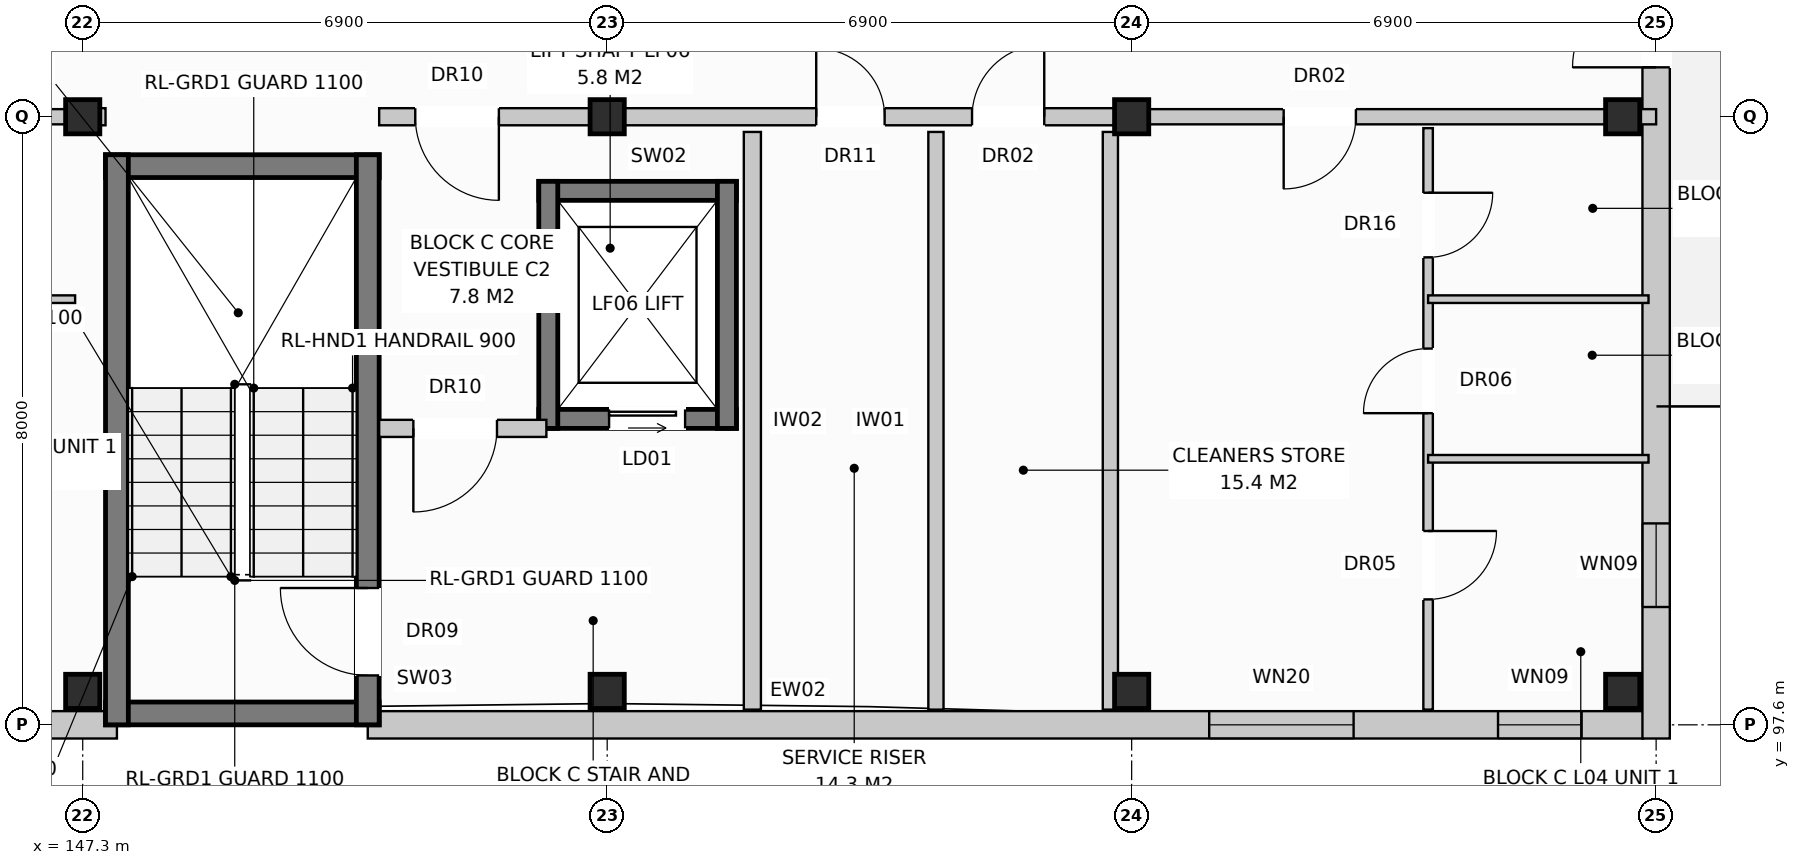
"""IFC4 building model, lengths in metres.
Left out: names, types, materials, properties, quantities, classifications, styles, units other than length and angle.
Written with IfcOpenShell. Run it as: python <this file> out.ifc"""

import sys

from ifc_helpers import new_model, si_unit, direction, frame, frame_2d, origin, origin_with_axes, origin_2d, place, context, subcontext, project, spatial, rectangle, extrude, element, fill, save


model = new_model("IFC4")
c1 = context("Model", 3, precision=1e-05, world=origin(), true_north=direction((0.0, 1.0)))
c2 = subcontext(c1, "Body", "Model", "MODEL_VIEW")
j1 = project(units=[si_unit("LENGTHUNIT", "METRE"), si_unit("PLANEANGLEUNIT", "RADIAN")], contexts=[c1])
p1 = place(None, origin())
s1 = spatial("IfcSite", under=j1, at=p1, CompositionType="ELEMENT")
p2 = place(p1, origin())
s2 = spatial("IfcBuilding", under=s1, at=p2, CompositionType="ELEMENT")
p3 = place(p2, frame((0.0, 0.0, 14.4)))
s3 = spatial("IfcBuildingStorey", under=s2, at=p3, CompositionType="ELEMENT", Elevation=14.4)
for number, where, z_axis, x_axis in (
    (1, (147.3, 98.04, 0.0), (0.0, 0.0, 1.0), (1.0, 0.0, 0.0)),
    (2, (147.3, 105.6, 0.0), (0.0, 0.0, 1.0), (1.0, 0.0, 0.0)),
    (3, (154.2, 98.04, 0.0), (0.0, 0.0, 1.0), (1.0, 0.0, 0.0)),
    (4, (154.2, 105.6, 0.0), (0.0, 0.0, 1.0), (1.0, 0.0, 0.0)),
    (5, (161.1, 98.04, 0.0), (0.0, 0.0, 1.0), (1.0, 0.0, 0.0)),
    (6, (161.1, 105.6, 0.0), (0.0, 0.0, 1.0), (1.0, 0.0, 0.0)),
    (7, (167.56, 98.04, 0.0), (0.0, 0.0, 1.0), (1.0, 0.0, 0.0)),
    (8, (167.56, 105.6, 0.0), (0.0, 0.0, 1.0), (1.0, 0.0, 0.0)),
):
    element("IfcColumn", number, at=place(p3, frame(where, z_axis=z_axis, x_axis=x_axis)), inside=s3, PredefinedType="COLUMN", context=c2, shape_type="SweptSolid", body=[
        extrude(rectangle(XDim=0.45, YDim=0.45, at=origin_2d()), origin(), (0.0, 0.0, 1.0), 3.2),
    ])
p4 = place(p3, frame((130.35, 97.6, 0.0), z_axis=(0.0, 0.0, 1.0), x_axis=(1.0, 0.0, 0.0)))
e9 = element("IfcWall", 9, at=p4, inside=s3, PredefinedType="STANDARD", context=c2, shape_type="SweptSolid", body=[
    extrude(rectangle(XDim=17.4, YDim=0.36, at=frame_2d((8.7, 0.0))), origin(), (0.0, 0.0, 1.0), 2.94),
])
p5 = place(p4, frame((11.82, 0.0, 0.0)))
e10 = element("IfcOpeningElement", 10, at=p5, cuts=e9, PredefinedType="OPENING", context=c2, shape_type="SweptSolid", body=[
    extrude(rectangle(XDim=1.05, YDim=2.12, at=frame_2d((0.525, 1.06))), frame((0.0, 0.192, 0.0), z_axis=(0.0, -1.0, 0.0), x_axis=(1.0, 0.0, 0.0)), (0.0, 0.0, 1.0), 0.384),
])
p6 = place(p4, frame((14.87, 0.0, 0.72)))
e11 = element("IfcOpeningElement", 11, at=p6, cuts=e9, PredefinedType="OPENING", context=c2, shape_type="SweptSolid", body=[
    extrude(rectangle(XDim=1.1, YDim=1.5, at=frame_2d((0.55, 0.75))), frame((0.0, 0.192, 0.0), z_axis=(0.0, -1.0, 0.0), x_axis=(1.0, 0.0, 0.0)), (0.0, 0.0, 1.0), 0.384),
])
p7 = place(p3, frame((151.05, 97.6, 0.0), z_axis=(0.0, 0.0, 1.0), x_axis=(1.0, 0.0, 0.0)))
e12 = element("IfcWall", 12, at=p7, inside=s3, PredefinedType="STANDARD", context=c2, shape_type="SweptSolid", body=[
    extrude(rectangle(XDim=16.78, YDim=0.36, at=frame_2d((8.39, 0.0))), origin(), (0.0, 0.0, 1.0), 2.94),
])
p8 = place(p7, frame((11.07, 0.0, 0.8)))
e13 = element("IfcOpeningElement", 13, at=p8, cuts=e12, PredefinedType="OPENING", context=c2, shape_type="SweptSolid", body=[
    extrude(rectangle(XDim=1.9, YDim=1.85, at=frame_2d((0.95, 0.925))), frame((0.0, 0.192, 0.0), z_axis=(0.0, -1.0, 0.0), x_axis=(1.0, 0.0, 0.0)), (0.0, 0.0, 1.0), 0.384),
])
p9 = place(p7, frame((14.87, 0.0, 0.72)))
e14 = element("IfcOpeningElement", 14, at=p9, cuts=e12, PredefinedType="OPENING", context=c2, shape_type="SweptSolid", body=[
    extrude(rectangle(XDim=1.1, YDim=1.5, at=frame_2d((0.55, 0.75))), frame((0.0, 0.192, 0.0), z_axis=(0.0, -1.0, 0.0), x_axis=(1.0, 0.0, 0.0)), (0.0, 0.0, 1.0), 0.384),
])
p10 = place(p3, frame((168.0, 97.42, 0.0), z_axis=(0.0, 0.0, 1.0), x_axis=(0.0, 1.0, 0.0)))
e15 = element("IfcWall", 15, at=p10, inside=s3, PredefinedType="STANDARD", context=c2, shape_type="SweptSolid", body=[
    extrude(rectangle(XDim=18.76, YDim=0.36, at=frame_2d((9.38, 0.0))), origin(), (0.0, 0.0, 1.0), 2.94),
])
p11 = place(p10, frame((8.83, 0.0, 0.0)))
e16 = element("IfcOpeningElement", 16, at=p11, cuts=e15, PredefinedType="OPENING", context=c2, shape_type="SweptSolid", body=[
    extrude(rectangle(XDim=1.1, YDim=2.1, at=frame_2d((0.55, 1.05))), frame((0.0, 0.192, 0.0), z_axis=(0.0, -1.0, 0.0), x_axis=(1.0, 0.0, 0.0)), (0.0, 0.0, 1.0), 0.384),
])
p12 = place(p10, frame((1.73, 0.0, 0.72)))
e17 = element("IfcOpeningElement", 17, at=p12, cuts=e15, PredefinedType="OPENING", context=c2, shape_type="SweptSolid", body=[
    extrude(rectangle(XDim=1.1, YDim=1.5, at=frame_2d((0.55, 0.75))), frame((0.0, 0.192, 0.0), z_axis=(0.0, -1.0, 0.0), x_axis=(1.0, 0.0, 0.0)), (0.0, 0.0, 1.0), 0.384),
])
p13 = place(p10, frame((15.93, 0.0, 0.72)))
e18 = element("IfcOpeningElement", 18, at=p13, cuts=e15, PredefinedType="OPENING", context=c2, shape_type="SweptSolid", body=[
    extrude(rectangle(XDim=1.1, YDim=1.5, at=frame_2d((0.55, 0.75))), frame((0.0, 0.192, 0.0), z_axis=(0.0, -1.0, 0.0), x_axis=(1.0, 0.0, 0.0)), (0.0, 0.0, 1.0), 0.384),
])
for number, where, z_axis, x_axis in (
    (19, (147.6, 97.75, 0.0), (0.0, 0.0, 1.0), (1.0, 0.0, 0.0)),
    (20, (147.6, 104.95, 0.0), (0.0, 0.0, 1.0), (1.0, 0.0, 0.0)),
):
    element("IfcWall", number, at=place(p3, frame(where, z_axis=z_axis, x_axis=x_axis)), inside=s3, PredefinedType="SHEAR", context=c2, shape_type="SweptSolid", body=[
        extrude(rectangle(XDim=3.6, YDim=0.3, at=frame_2d((1.8, 0.0))), origin(), (0.0, 0.0, 1.0), 2.94),
    ])
p14 = place(p3, frame((147.75, 97.6, 0.0), z_axis=(0.0, 0.0, 1.0), x_axis=(0.0, 1.0, 0.0)))
e21 = element("IfcWall", 21, at=p14, inside=s3, PredefinedType="SHEAR", context=c2, shape_type="SweptSolid", body=[
    extrude(rectangle(XDim=7.5, YDim=0.3, at=frame_2d((3.75, 0.0))), origin(), (0.0, 0.0, 1.0), 2.94),
])
p15 = place(p3, frame((151.05, 97.6, 0.0), z_axis=(0.0, 0.0, 1.0), x_axis=(0.0, 1.0, 0.0)))
e22 = element("IfcWall", 22, at=p15, inside=s3, PredefinedType="SHEAR", context=c2, shape_type="SweptSolid", body=[
    extrude(rectangle(XDim=7.5, YDim=0.3, at=frame_2d((3.75, 0.0))), origin(), (0.0, 0.0, 1.0), 2.94),
])
p16 = place(p15, frame((0.65, 0.0, 0.0)))
e23 = element("IfcOpeningElement", 23, at=p16, cuts=e22, PredefinedType="OPENING", context=c2, shape_type="SweptSolid", body=[
    extrude(rectangle(XDim=1.15, YDim=2.15, at=frame_2d((0.575, 1.075))), frame((0.0, 0.162, 0.0), z_axis=(0.0, -1.0, 0.0), x_axis=(1.0, 0.0, 0.0)), (0.0, 0.0, 1.0), 0.324),
])
p17 = place(p3, frame((153.3, 101.625, 0.0), z_axis=(0.0, 0.0, 1.0), x_axis=(1.0, 0.0, 0.0)))
e24 = element("IfcWall", 24, at=p17, inside=s3, PredefinedType="SHEAR", context=c2, shape_type="SweptSolid", body=[
    extrude(rectangle(XDim=2.6, YDim=0.25, at=frame_2d((1.3, 0.0))), origin(), (0.0, 0.0, 1.0), 2.94),
])
p18 = place(p17, frame((0.925, 0.0, 0.0)))
e25 = element("IfcOpeningElement", 25, at=p18, cuts=e24, PredefinedType="OPENING", context=c2, shape_type="SweptSolid", body=[
    extrude(rectangle(XDim=1.0, YDim=2.1, at=frame_2d((0.5, 1.05))), frame((0.0, 0.137, 0.0), z_axis=(0.0, -1.0, 0.0), x_axis=(1.0, 0.0, 0.0)), (0.0, 0.0, 1.0), 0.274),
])
p19 = place(p3, frame((153.3, 104.625, 0.0), z_axis=(0.0, 0.0, 1.0), x_axis=(1.0, 0.0, 0.0)))
e26 = element("IfcWall", 26, at=p19, inside=s3, PredefinedType="SHEAR", context=c2, shape_type="SweptSolid", body=[
    extrude(rectangle(XDim=2.6, YDim=0.25, at=frame_2d((1.3, 0.0))), origin(), (0.0, 0.0, 1.0), 2.94),
])
for number, where, z_axis, x_axis in (
    (27, (153.425, 101.5, 0.0), (0.0, 0.0, 1.0), (0.0, 1.0, 0.0)),
    (28, (155.775, 101.5, 0.0), (0.0, 0.0, 1.0), (0.0, 1.0, 0.0)),
):
    element("IfcWall", number, at=place(p3, frame(where, z_axis=z_axis, x_axis=x_axis)), inside=s3, PredefinedType="SHEAR", context=c2, shape_type="SweptSolid", body=[
        extrude(rectangle(XDim=3.25, YDim=0.25, at=frame_2d((1.625, 0.0))), origin(), (0.0, 0.0, 1.0), 2.94),
    ])
p20 = place(p3, frame((156.11, 97.8, 0.0), z_axis=(0.0, 0.0, 1.0), x_axis=(0.0, 1.0, 0.0)))
e29 = element("IfcWall", 29, at=p20, inside=s3, PredefinedType="PARTITIONING", context=c2, shape_type="SweptSolid", body=[
    extrude(rectangle(XDim=7.6, YDim=0.225, at=frame_2d((3.8, 0.0))), origin(), (0.0, 0.0, 1.0), 2.59),
])
p21 = place(p3, frame((151.2, 101.5, 0.0), z_axis=(0.0, 0.0, 1.0), x_axis=(1.0, 0.0, 0.0)))
e30 = element("IfcWall", 30, at=p21, inside=s3, PredefinedType="PARTITIONING", context=c2, shape_type="SweptSolid", body=[
    extrude(rectangle(XDim=2.2, YDim=0.225, at=frame_2d((1.1, 0.0))), origin(), (0.0, 0.0, 1.0), 2.94),
])
p22 = place(p21, frame((0.45, 0.0, 0.0)))
e31 = element("IfcOpeningElement", 31, at=p22, cuts=e30, PredefinedType="OPENING", context=c2, shape_type="SweptSolid", body=[
    extrude(rectangle(XDim=1.1, YDim=2.15, at=frame_2d((0.55, 1.075))), frame((0.0, 0.125, 0.0), z_axis=(0.0, -1.0, 0.0), x_axis=(1.0, 0.0, 0.0)), (0.0, 0.0, 1.0), 0.249),
])
p23 = place(p3, frame((147.3, 105.6, 0.0), z_axis=(0.0, 0.0, 1.0), x_axis=(1.0, 0.0, 0.0)))
e32 = element("IfcWall", 32, at=p23, inside=s3, PredefinedType="PARTITIONING", context=c2, shape_type="SweptSolid", body=[
    extrude(rectangle(XDim=0.3, YDim=0.225, at=frame_2d((0.15, 0.0))), origin(), (0.0, 0.0, 1.0), 2.94),
])
p24 = place(p3, frame((158.525, 97.8, 0.0), z_axis=(0.0, 0.0, 1.0), x_axis=(0.0, 1.0, 0.0)))
e33 = element("IfcWall", 33, at=p24, inside=s3, PredefinedType="PARTITIONING", context=c2, shape_type="SweptSolid", body=[
    extrude(rectangle(XDim=7.6, YDim=0.2, at=frame_2d((3.8, 0.0))), origin(), (0.0, 0.0, 1.0), 2.94),
])
p25 = place(p3, frame((160.82, 97.8, 0.0), z_axis=(0.0, 0.0, 1.0), x_axis=(0.0, 1.0, 0.0)))
e34 = element("IfcWall", 34, at=p25, inside=s3, PredefinedType="PARTITIONING", context=c2, shape_type="SweptSolid", body=[
    extrude(rectangle(XDim=7.6, YDim=0.2, at=frame_2d((3.8, 0.0))), origin(), (0.0, 0.0, 1.0), 2.38),
])
p26 = place(p3, frame((151.2, 105.6, 0.0), z_axis=(0.0, 0.0, 1.0), x_axis=(1.0, 0.0, 0.0)))
e35 = element("IfcWall", 35, at=p26, inside=s3, PredefinedType="PARTITIONING", context=c2, shape_type="SweptSolid", body=[
    extrude(rectangle(XDim=9.9, YDim=0.225, at=frame_2d((4.95, 0.0))), origin(), (0.0, 0.0, 1.0), 2.38),
])
p27 = place(p26, frame((0.475, 0.0, 0.0)))
e36 = element("IfcOpeningElement", 36, at=p27, cuts=e35, PredefinedType="OPENING", context=c2, shape_type="SweptSolid", body=[
    extrude(rectangle(XDim=1.1, YDim=2.15, at=frame_2d((0.55, 1.075))), frame((0.0, 0.125, 0.0), z_axis=(0.0, -1.0, 0.0), x_axis=(1.0, 0.0, 0.0)), (0.0, 0.0, 1.0), 0.249),
])
p28 = place(p26, frame((5.75, 0.0, 0.0)))
e37 = element("IfcOpeningElement", 37, at=p28, cuts=e35, PredefinedType="OPENING", context=c2, shape_type="SweptSolid", body=[
    extrude(rectangle(XDim=0.9, YDim=2.1, at=frame_2d((0.45, 1.05))), frame((0.0, 0.125, 0.0), z_axis=(0.0, -1.0, 0.0), x_axis=(1.0, 0.0, 0.0)), (0.0, 0.0, 1.0), 0.249),
])
p29 = place(p26, frame((7.8, 0.0, 0.0)))
e38 = element("IfcOpeningElement", 38, at=p29, cuts=e35, PredefinedType="OPENING", context=c2, shape_type="SweptSolid", body=[
    extrude(rectangle(XDim=0.95, YDim=2.15, at=frame_2d((0.475, 1.075))), frame((0.0, 0.125, 0.0), z_axis=(0.0, -1.0, 0.0), x_axis=(1.0, 0.0, 0.0)), (0.0, 0.0, 1.0), 0.249),
])
p30 = place(p3, frame((140.4, 105.6, 0.0), z_axis=(0.0, 0.0, 1.0), x_axis=(1.0, 0.0, 0.0)))
e39 = element("IfcWall", 39, at=p30, inside=s3, PredefinedType="PARTITIONING", context=c2, shape_type="SweptSolid", body=[
    extrude(rectangle(XDim=6.9, YDim=0.2, at=frame_2d((3.45, 0.0))), origin(), (0.0, 0.0, 1.0), 2.38),
])
p31 = place(p30, frame((2.0, 0.0, 0.0)))
e40 = element("IfcOpeningElement", 40, at=p31, cuts=e39, PredefinedType="OPENING", context=c2, shape_type="SweptSolid", body=[
    extrude(rectangle(XDim=0.95, YDim=2.15, at=frame_2d((0.475, 1.075))), frame((0.0, 0.112, 0.0), z_axis=(0.0, -1.0, 0.0), x_axis=(1.0, 0.0, 0.0)), (0.0, 0.0, 1.0), 0.224),
])
for number, where, z_axis, x_axis in (
    (41, (144.3, 103.2, 0.0), (0.0, 0.0, 1.0), (1.0, 0.0, 0.0)),
    (42, (144.3, 101.1, 0.0), (0.0, 0.0, 1.0), (1.0, 0.0, 0.0)),
):
    element("IfcWall", number, at=place(p3, frame(where, z_axis=z_axis, x_axis=x_axis)), inside=s3, PredefinedType="PARTITIONING", context=c2, shape_type="SweptSolid", body=[
        extrude(rectangle(XDim=2.9, YDim=0.1, at=frame_2d((1.45, 0.0))), origin(), (0.0, 0.0, 1.0), 2.94),
    ])
p32 = place(p3, frame((161.1, 105.6, 0.0), z_axis=(0.0, 0.0, 1.0), x_axis=(1.0, 0.0, 0.0)))
e43 = element("IfcWall", 43, at=p32, inside=s3, PredefinedType="PARTITIONING", context=c2, shape_type="SweptSolid", body=[
    extrude(rectangle(XDim=6.9, YDim=0.2, at=frame_2d((3.45, 0.0))), origin(), (0.0, 0.0, 1.0), 2.38),
])
p33 = place(p32, frame((2.0, 0.0, 0.0)))
e44 = element("IfcOpeningElement", 44, at=p33, cuts=e43, PredefinedType="OPENING", context=c2, shape_type="SweptSolid", body=[
    extrude(rectangle(XDim=0.95, YDim=2.15, at=frame_2d((0.475, 1.075))), frame((0.0, 0.112, 0.0), z_axis=(0.0, -1.0, 0.0), x_axis=(1.0, 0.0, 0.0)), (0.0, 0.0, 1.0), 0.224),
])
p34 = place(p3, frame((165.0, 105.45, 0.0), z_axis=(0.0, 0.0, 1.0), x_axis=(0.0, -1.0, 0.0)))
e45 = element("IfcWall", 45, at=p34, inside=s3, PredefinedType="PARTITIONING", context=c2, shape_type="SweptSolid", body=[
    extrude(rectangle(XDim=7.65, YDim=0.125, at=frame_2d((3.825, 0.0))), origin(), (0.0, 0.0, 1.0), 2.94),
])
p35 = place(p34, frame((0.85, 0.0, 0.0)))
e46 = element("IfcOpeningElement", 46, at=p35, cuts=e45, PredefinedType="OPENING", context=c2, shape_type="SweptSolid", body=[
    extrude(rectangle(XDim=0.85, YDim=2.1, at=frame_2d((0.425, 1.05))), frame((0.0, 0.074, 0.0), z_axis=(0.0, -1.0, 0.0), x_axis=(1.0, 0.0, 0.0)), (0.0, 0.0, 1.0), 0.149),
])
p36 = place(p34, frame((2.9, 0.0, 0.0)))
e47 = element("IfcOpeningElement", 47, at=p36, cuts=e45, PredefinedType="OPENING", context=c2, shape_type="SweptSolid", body=[
    extrude(rectangle(XDim=0.85, YDim=2.05, at=frame_2d((0.425, 1.025))), frame((0.0, 0.074, 0.0), z_axis=(0.0, -1.0, 0.0), x_axis=(1.0, 0.0, 0.0)), (0.0, 0.0, 1.0), 0.149),
])
p37 = place(p34, frame((5.3, 0.0, 0.0)))
e48 = element("IfcOpeningElement", 48, at=p37, cuts=e45, PredefinedType="OPENING", context=c2, shape_type="SweptSolid", body=[
    extrude(rectangle(XDim=0.9, YDim=2.1, at=frame_2d((0.45, 1.05))), frame((0.0, 0.074, 0.0), z_axis=(0.0, -1.0, 0.0), x_axis=(1.0, 0.0, 0.0)), (0.0, 0.0, 1.0), 0.149),
])
for number, where, z_axis, x_axis in (
    (49, (165.0, 103.2, 0.0), (0.0, 0.0, 1.0), (1.0, 0.0, 0.0)),
    (50, (165.0, 101.1, 0.0), (0.0, 0.0, 1.0), (1.0, 0.0, 0.0)),
):
    element("IfcWall", number, at=place(p3, frame(where, z_axis=z_axis, x_axis=x_axis)), inside=s3, PredefinedType="PARTITIONING", context=c2, shape_type="SweptSolid", body=[
        extrude(rectangle(XDim=2.9, YDim=0.1, at=frame_2d((1.45, 0.0))), origin(), (0.0, 0.0, 1.0), 2.94),
    ])
p38 = place(p8, origin_with_axes())
e51 = element("IfcWindow", 51, at=p38, inside=s3, PartitioningType="SINGLE_PANEL", PredefinedType="WINDOW", context=c2, shape_type="SweptSolid", body=[
    extrude(rectangle(XDim=1.9, YDim=1.85, at=frame_2d((0.95, 0.925))), frame((0.0, 0.03, 0.0), z_axis=(0.0, -1.0, 0.0), x_axis=(1.0, 0.0, 0.0)), (0.0, 0.0, 1.0), 0.06),
])
fill(e13, e51)
p39 = place(p9, origin_with_axes())
e52 = element("IfcWindow", 52, at=p39, inside=s3, PartitioningType="SINGLE_PANEL", PredefinedType="WINDOW", context=c2, shape_type="SweptSolid", body=[
    extrude(rectangle(XDim=1.1, YDim=1.5, at=frame_2d((0.55, 0.75))), frame((0.0, 0.03, 0.0), z_axis=(0.0, -1.0, 0.0), x_axis=(1.0, 0.0, 0.0)), (0.0, 0.0, 1.0), 0.06),
])
fill(e14, e52)
p40 = place(p11, origin_with_axes())
e53 = element("IfcDoor", 53, at=p40, inside=s3, OperationType="SINGLE_SWING_LEFT", PredefinedType="DOOR", context=c2, shape_type="SweptSolid", body=[
    extrude(rectangle(XDim=1.1, YDim=2.1, at=frame_2d((0.55, 1.05))), frame((0.0, 0.025, 0.0), z_axis=(0.0, -1.0, 0.0), x_axis=(1.0, 0.0, 0.0)), (0.0, 0.0, 1.0), 0.05),
])
fill(e16, e53)
p41 = place(p12, origin_with_axes())
e54 = element("IfcWindow", 54, at=p41, inside=s3, PartitioningType="SINGLE_PANEL", PredefinedType="WINDOW", context=c2, shape_type="SweptSolid", body=[
    extrude(rectangle(XDim=1.1, YDim=1.5, at=frame_2d((0.55, 0.75))), frame((0.0, 0.03, 0.0), z_axis=(0.0, -1.0, 0.0), x_axis=(1.0, 0.0, 0.0)), (0.0, 0.0, 1.0), 0.06),
])
fill(e17, e54)
p42 = place(p16, origin_with_axes())
e55 = element("IfcDoor", 55, at=p42, inside=s3, OperationType="SINGLE_SWING_RIGHT", PredefinedType="DOOR", context=c2, shape_type="SweptSolid", body=[
    extrude(rectangle(XDim=1.15, YDim=2.15, at=frame_2d((0.575, 1.075))), frame((0.0, 0.025, 0.0), z_axis=(0.0, -1.0, 0.0), x_axis=(1.0, 0.0, 0.0)), (0.0, 0.0, 1.0), 0.05),
])
fill(e23, e55)
p43 = place(p18, origin_with_axes())
e56 = element("IfcDoor", 56, at=p43, inside=s3, OperationType="SLIDING_TO_LEFT", PredefinedType="DOOR", context=c2, shape_type="SweptSolid", body=[
    extrude(rectangle(XDim=1.0, YDim=2.1, at=frame_2d((0.5, 1.05))), frame((0.0, 0.025, 0.0), z_axis=(0.0, -1.0, 0.0), x_axis=(1.0, 0.0, 0.0)), (0.0, 0.0, 1.0), 0.05),
])
fill(e25, e56)
p44 = place(p22, frame((1.1, 0.0, 0.0), z_axis=(0.0, 0.0, 1.0), x_axis=(-1.0, 0.0, 0.0)))
e57 = element("IfcDoor", 57, at=p44, inside=s3, OperationType="SINGLE_SWING_LEFT", PredefinedType="DOOR", context=c2, shape_type="SweptSolid", body=[
    extrude(rectangle(XDim=1.1, YDim=2.15, at=frame_2d((0.55, 1.075))), frame((0.0, 0.025, 0.0), z_axis=(0.0, -1.0, 0.0), x_axis=(1.0, 0.0, 0.0)), (0.0, 0.0, 1.0), 0.05),
])
fill(e31, e57)
p45 = place(p27, frame((1.1, 0.0, 0.0), z_axis=(0.0, 0.0, 1.0), x_axis=(-1.0, 0.0, 0.0)))
e58 = element("IfcDoor", 58, at=p45, inside=s3, OperationType="SINGLE_SWING_RIGHT", PredefinedType="DOOR", context=c2, shape_type="SweptSolid", body=[
    extrude(rectangle(XDim=1.1, YDim=2.15, at=frame_2d((0.55, 1.075))), frame((0.0, 0.025, 0.0), z_axis=(0.0, -1.0, 0.0), x_axis=(1.0, 0.0, 0.0)), (0.0, 0.0, 1.0), 0.05),
])
fill(e36, e58)
p46 = place(p28, origin_with_axes())
e59 = element("IfcDoor", 59, at=p46, inside=s3, OperationType="SINGLE_SWING_LEFT", PredefinedType="DOOR", context=c2, shape_type="SweptSolid", body=[
    extrude(rectangle(XDim=0.9, YDim=2.1, at=frame_2d((0.45, 1.05))), frame((0.0, 0.025, 0.0), z_axis=(0.0, -1.0, 0.0), x_axis=(1.0, 0.0, 0.0)), (0.0, 0.0, 1.0), 0.05),
])
fill(e37, e59)
p47 = place(p29, origin_with_axes())
e60 = element("IfcDoor", 60, at=p47, inside=s3, OperationType="SINGLE_SWING_RIGHT", PredefinedType="DOOR", context=c2, shape_type="SweptSolid", body=[
    extrude(rectangle(XDim=0.95, YDim=2.15, at=frame_2d((0.475, 1.075))), frame((0.0, 0.025, 0.0), z_axis=(0.0, -1.0, 0.0), x_axis=(1.0, 0.0, 0.0)), (0.0, 0.0, 1.0), 0.05),
])
fill(e38, e60)
p48 = place(p33, frame((0.95, 0.0, 0.0), z_axis=(0.0, 0.0, 1.0), x_axis=(-1.0, 0.0, 0.0)))
e61 = element("IfcDoor", 61, at=p48, inside=s3, OperationType="SINGLE_SWING_LEFT", PredefinedType="DOOR", context=c2, shape_type="SweptSolid", body=[
    extrude(rectangle(XDim=0.95, YDim=2.15, at=frame_2d((0.475, 1.075))), frame((0.0, 0.025, 0.0), z_axis=(0.0, -1.0, 0.0), x_axis=(1.0, 0.0, 0.0)), (0.0, 0.0, 1.0), 0.05),
])
fill(e44, e61)
p49 = place(p35, origin_with_axes())
e62 = element("IfcDoor", 62, at=p49, inside=s3, OperationType="SINGLE_SWING_LEFT", PredefinedType="DOOR", context=c2, shape_type="SweptSolid", body=[
    extrude(rectangle(XDim=0.85, YDim=2.1, at=frame_2d((0.425, 1.05))), frame((0.0, 0.025, 0.0), z_axis=(0.0, -1.0, 0.0), x_axis=(1.0, 0.0, 0.0)), (0.0, 0.0, 1.0), 0.05),
])
fill(e46, e62)
p50 = place(p36, frame((0.85, 0.0, 0.0), z_axis=(0.0, 0.0, 1.0), x_axis=(-1.0, 0.0, 0.0)))
e63 = element("IfcDoor", 63, at=p50, inside=s3, OperationType="SINGLE_SWING_RIGHT", PredefinedType="DOOR", context=c2, shape_type="SweptSolid", body=[
    extrude(rectangle(XDim=0.85, YDim=2.05, at=frame_2d((0.425, 1.025))), frame((0.0, 0.025, 0.0), z_axis=(0.0, -1.0, 0.0), x_axis=(1.0, 0.0, 0.0)), (0.0, 0.0, 1.0), 0.05),
])
fill(e47, e63)
p51 = place(p37, origin_with_axes())
e64 = element("IfcDoor", 64, at=p51, inside=s3, OperationType="SINGLE_SWING_LEFT", PredefinedType="DOOR", context=c2, shape_type="SweptSolid", body=[
    extrude(rectangle(XDim=0.9, YDim=2.1, at=frame_2d((0.45, 1.05))), frame((0.0, 0.025, 0.0), z_axis=(0.0, -1.0, 0.0), x_axis=(1.0, 0.0, 0.0)), (0.0, 0.0, 1.0), 0.05),
])
fill(e48, e64)
save(model, sys.argv[1])
